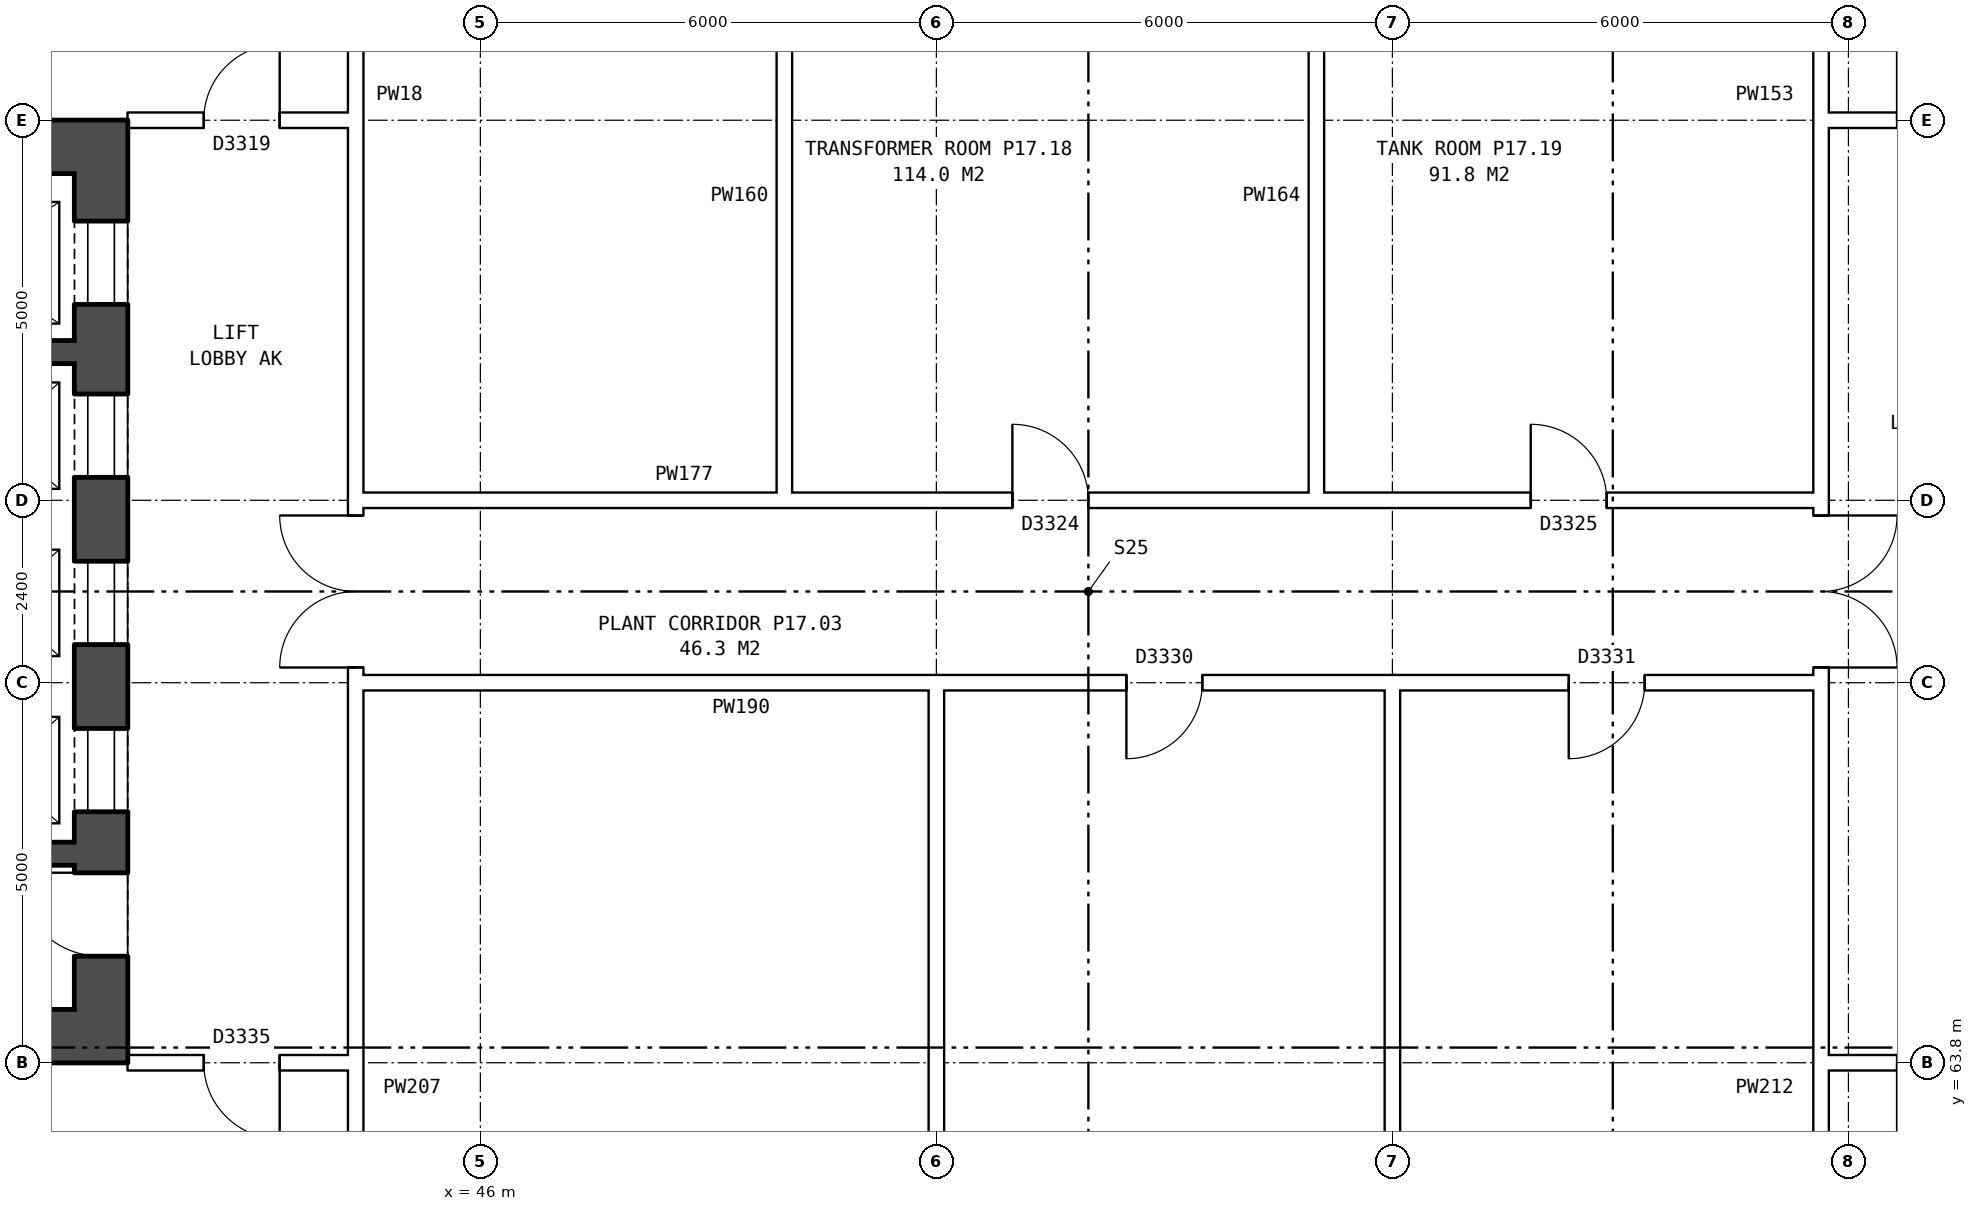
"""IFC4 building model, lengths in metres.
Left out: names, types, materials, properties, quantities, classifications, styles, units other than length and angle.
Written with IfcOpenShell. Run it as: python <this file> out.ifc"""

import sys

from ifc_helpers import new_model, si_unit, direction, frame, frame_2d, origin, place, context, subcontext, project, spatial, rectangle, extrude, element, fill, save


model = new_model("IFC4")
c1 = context("Model", 3, precision=1e-05, world=origin(), true_north=direction((0.0, 1.0)))
c2 = subcontext(c1, "Body", "Model", "MODEL_VIEW")
j1 = project(units=[si_unit("LENGTHUNIT", "METRE"), si_unit("PLANEANGLEUNIT", "RADIAN")], contexts=[c1])
p1 = place(None, origin())
s1 = spatial("IfcSite", under=j1, at=p1, CompositionType="ELEMENT")
p2 = place(p1, origin())
s2 = spatial("IfcBuilding", under=s1, at=p2, CompositionType="ELEMENT")
p3 = place(p2, frame((0.0, 0.0, 62.9)))
s3 = spatial("IfcBuildingStorey", under=s2, at=p3, CompositionType="ELEMENT", Elevation=62.9)
p4 = place(p3, frame((63.64, 63.9, 0.0), z_axis=(0.0, 0.0, 1.0), x_axis=(0.0, 1.0, 0.0)))
e1 = element("IfcWall", 1, at=p4, inside=s3, PredefinedType="PARTITIONING", context=c2, shape_type="SweptSolid", body=[
    extrude(rectangle(XDim=12.2, YDim=0.2, at=frame_2d((6.1, 0.0))), origin(), (0.0, 0.0, 1.0), 4.2),
])
p5 = place(p4, frame((5.1, 0.0, 0.0)))
e2 = element("IfcOpeningElement", 2, at=p5, cuts=e1, PredefinedType="OPENING", context=c2, shape_type="SweptSolid", body=[
    extrude(rectangle(XDim=2.0, YDim=2.1, at=frame_2d((1.0, 1.05))), frame((0.0, 0.11, 0.0), z_axis=(0.0, -1.0, 0.0), x_axis=(1.0, 0.0, 0.0)), (0.0, 0.0, 1.0), 0.22),
])
p6 = place(p3, frame((41.01, 75.5, 0.0), z_axis=(0.0, 0.0, 1.0), x_axis=(0.0, -1.0, 0.0)))
e3 = element("IfcWall", 3, at=p6, inside=s3, PredefinedType="SHEAR", context=c2, shape_type="SweptSolid", body=[
    extrude(rectangle(XDim=11.0, YDim=0.7, at=frame_2d((5.5, 0.0))), origin(), (0.0, 0.0, 1.0), 4.2),
])
p7 = place(p6, frame((0.625, 0.0, 0.0)))
e4 = element("IfcOpeningElement", 4, at=p7, cuts=e3, PredefinedType="OPENING", context=c2, shape_type="SweptSolid", body=[
    extrude(rectangle(XDim=1.1, YDim=2.1, at=frame_2d((0.55, 1.05))), frame((0.0, 0.36, 0.0), z_axis=(0.0, -1.0, 0.0), x_axis=(1.0, 0.0, 0.0)), (0.0, 0.0, 1.0), 0.72),
])
p8 = place(p6, frame((2.9, 0.0, 0.0)))
e5 = element("IfcOpeningElement", 5, at=p8, cuts=e3, PredefinedType="OPENING", context=c2, shape_type="SweptSolid", body=[
    extrude(rectangle(XDim=1.1, YDim=2.1, at=frame_2d((0.55, 1.05))), frame((0.0, 0.36, 0.0), z_axis=(0.0, -1.0, 0.0), x_axis=(1.0, 0.0, 0.0)), (0.0, 0.0, 1.0), 0.72),
])
p9 = place(p6, frame((5.1, 0.0, 0.0)))
e6 = element("IfcOpeningElement", 6, at=p9, cuts=e3, PredefinedType="OPENING", context=c2, shape_type="SweptSolid", body=[
    extrude(rectangle(XDim=1.1, YDim=2.1, at=frame_2d((0.55, 1.05))), frame((0.0, 0.36, 0.0), z_axis=(0.0, -1.0, 0.0), x_axis=(1.0, 0.0, 0.0)), (0.0, 0.0, 1.0), 0.72),
])
p10 = place(p6, frame((7.3, 0.0, 0.0)))
e7 = element("IfcOpeningElement", 7, at=p10, cuts=e3, PredefinedType="OPENING", context=c2, shape_type="SweptSolid", body=[
    extrude(rectangle(XDim=1.1, YDim=2.1, at=frame_2d((0.55, 1.05))), frame((0.0, 0.36, 0.0), z_axis=(0.0, -1.0, 0.0), x_axis=(1.0, 0.0, 0.0)), (0.0, 0.0, 1.0), 0.72),
])
p11 = place(p6, frame((9.2, 0.0, 0.0)))
e8 = element("IfcOpeningElement", 8, at=p11, cuts=e3, PredefinedType="OPENING", context=c2, shape_type="SweptSolid", body=[
    extrude(rectangle(XDim=1.1, YDim=2.1, at=frame_2d((0.55, 1.05))), frame((0.0, 0.36, 0.0), z_axis=(0.0, -1.0, 0.0), x_axis=(1.0, 0.0, 0.0)), (0.0, 0.0, 1.0), 0.72),
])
for number, where, z_axis, x_axis in (
    (9, (41.36, 75.85, 0.0), (0.0, 0.0, 1.0), (-1.0, 0.0, 0.0)),
    (10, (41.36, 64.15, 0.0), (0.0, 0.0, 1.0), (-1.0, 0.0, 0.0)),
):
    element("IfcWall", number, at=place(p3, frame(where, z_axis=z_axis, x_axis=x_axis)), inside=s3, PredefinedType="SHEAR", context=c2, shape_type="SweptSolid", body=[
        extrude(rectangle(XDim=9.0, YDim=0.7, at=frame_2d((4.5, 0.0))), origin(), (0.0, 0.0, 1.0), 4.2),
    ])
p12 = place(p3, frame((40.66, 73.15, 0.0), z_axis=(0.0, 0.0, 1.0), x_axis=(-1.0, 0.0, 0.0)))
e11 = element("IfcWall", 11, at=p12, inside=s3, PredefinedType="SHEAR", context=c2, shape_type="SweptSolid", body=[
    extrude(rectangle(XDim=3.32, YDim=0.3, at=frame_2d((1.66, 0.0))), origin(), (0.0, 0.0, 1.0), 4.2),
])
p13 = place(p3, frame((40.66, 66.55, 0.0), z_axis=(0.0, 0.0, 1.0), x_axis=(-1.0, 0.0, 0.0)))
e12 = element("IfcWall", 12, at=p13, inside=s3, PredefinedType="SHEAR", context=c2, shape_type="SweptSolid", body=[
    extrude(rectangle(XDim=2.2, YDim=0.3, at=frame_2d((1.1, 0.0))), origin(), (0.0, 0.0, 1.0), 4.2),
])
p14 = place(p3, frame((44.36, 63.9, 0.0), z_axis=(0.0, 0.0, 1.0), x_axis=(0.0, 1.0, 0.0)))
e13 = element("IfcWall", 13, at=p14, inside=s3, PredefinedType="PARTITIONING", context=c2, shape_type="SweptSolid", body=[
    extrude(rectangle(XDim=12.2, YDim=0.2, at=frame_2d((6.1, 0.0))), origin(), (0.0, 0.0, 1.0), 4.2),
])
p15 = place(p14, frame((5.1, 0.0, 0.0)))
e14 = element("IfcOpeningElement", 14, at=p15, cuts=e13, PredefinedType="OPENING", context=c2, shape_type="SweptSolid", body=[
    extrude(rectangle(XDim=2.0, YDim=2.1, at=frame_2d((1.0, 1.05))), frame((0.0, 0.11, 0.0), z_axis=(0.0, -1.0, 0.0), x_axis=(1.0, 0.0, 0.0)), (0.0, 0.0, 1.0), 0.22),
])
p16 = place(p3, frame((41.36, 63.8, 0.0), z_axis=(0.0, 0.0, 1.0), x_axis=(1.0, 0.0, 0.0)))
e15 = element("IfcWall", 15, at=p16, inside=s3, PredefinedType="PARTITIONING", context=c2, shape_type="SweptSolid", body=[
    extrude(rectangle(XDim=3.1, YDim=0.2, at=frame_2d((1.55, 0.0))), origin(), (0.0, 0.0, 1.0), 4.2),
])
p17 = place(p16, frame((1.0, 0.0, 0.0)))
e16 = element("IfcOpeningElement", 16, at=p17, cuts=e15, PredefinedType="OPENING", context=c2, shape_type="SweptSolid", body=[
    extrude(rectangle(XDim=1.0, YDim=2.1, at=frame_2d((0.5, 1.05))), frame((0.0, 0.11, 0.0), z_axis=(0.0, -1.0, 0.0), x_axis=(1.0, 0.0, 0.0)), (0.0, 0.0, 1.0), 0.22),
])
p18 = place(p3, frame((63.54, 63.8, 0.0), z_axis=(0.0, 0.0, 1.0), x_axis=(1.0, 0.0, 0.0)))
e17 = element("IfcWall", 17, at=p18, inside=s3, PredefinedType="PARTITIONING", context=c2, shape_type="SweptSolid", body=[
    extrude(rectangle(XDim=3.1, YDim=0.2, at=frame_2d((1.55, 0.0))), origin(), (0.0, 0.0, 1.0), 4.2),
])
p19 = place(p18, frame((1.1, 0.0, 0.0)))
e18 = element("IfcOpeningElement", 18, at=p19, cuts=e17, PredefinedType="OPENING", context=c2, shape_type="SweptSolid", body=[
    extrude(rectangle(XDim=1.0, YDim=2.1, at=frame_2d((0.5, 1.05))), frame((0.0, 0.11, 0.0), z_axis=(0.0, -1.0, 0.0), x_axis=(1.0, 0.0, 0.0)), (0.0, 0.0, 1.0), 0.22),
])
p20 = place(p3, frame((44.36, 68.8, 0.0), z_axis=(0.0, 0.0, 1.0), x_axis=(1.0, 0.0, 0.0)))
e19 = element("IfcWall", 19, at=p20, inside=s3, PredefinedType="PARTITIONING", context=c2, shape_type="SweptSolid", body=[
    extrude(rectangle(XDim=19.28, YDim=0.2, at=frame_2d((9.64, 0.0))), origin(), (0.0, 0.0, 1.0), 4.2),
])
p21 = place(p20, frame((10.14, 0.0, 0.0)))
e20 = element("IfcOpeningElement", 20, at=p21, cuts=e19, PredefinedType="OPENING", context=c2, shape_type="SweptSolid", body=[
    extrude(rectangle(XDim=1.0, YDim=2.1, at=frame_2d((0.5, 1.05))), frame((0.0, 0.11, 0.0), z_axis=(0.0, -1.0, 0.0), x_axis=(1.0, 0.0, 0.0)), (0.0, 0.0, 1.0), 0.22),
])
p22 = place(p20, frame((15.96, 0.0, 0.0)))
e21 = element("IfcOpeningElement", 21, at=p22, cuts=e19, PredefinedType="OPENING", context=c2, shape_type="SweptSolid", body=[
    extrude(rectangle(XDim=1.0, YDim=2.1, at=frame_2d((0.5, 1.05))), frame((0.0, 0.11, 0.0), z_axis=(0.0, -1.0, 0.0), x_axis=(1.0, 0.0, 0.0)), (0.0, 0.0, 1.0), 0.22),
])
p23 = place(p3, frame((44.36, 71.2, 0.0), z_axis=(0.0, 0.0, 1.0), x_axis=(1.0, 0.0, 0.0)))
e22 = element("IfcWall", 22, at=p23, inside=s3, PredefinedType="PARTITIONING", context=c2, shape_type="SweptSolid", body=[
    extrude(rectangle(XDim=19.28, YDim=0.2, at=frame_2d((9.64, 0.0))), origin(), (0.0, 0.0, 1.0), 4.2),
])
p24 = place(p23, frame((8.64, 0.0, 0.0)))
e23 = element("IfcOpeningElement", 23, at=p24, cuts=e22, PredefinedType="OPENING", context=c2, shape_type="SweptSolid", body=[
    extrude(rectangle(XDim=1.0, YDim=2.1, at=frame_2d((0.5, 1.05))), frame((0.0, 0.11, 0.0), z_axis=(0.0, -1.0, 0.0), x_axis=(1.0, 0.0, 0.0)), (0.0, 0.0, 1.0), 0.22),
])
p25 = place(p23, frame((15.46, 0.0, 0.0)))
e24 = element("IfcOpeningElement", 24, at=p25, cuts=e22, PredefinedType="OPENING", context=c2, shape_type="SweptSolid", body=[
    extrude(rectangle(XDim=1.0, YDim=2.1, at=frame_2d((0.5, 1.05))), frame((0.0, 0.11, 0.0), z_axis=(0.0, -1.0, 0.0), x_axis=(1.0, 0.0, 0.0)), (0.0, 0.0, 1.0), 0.22),
])
p26 = place(p3, frame((41.36, 76.2, 0.0), z_axis=(0.0, 0.0, 1.0), x_axis=(1.0, 0.0, 0.0)))
e25 = element("IfcWall", 25, at=p26, inside=s3, PredefinedType="PARTITIONING", context=c2, shape_type="SweptSolid", body=[
    extrude(rectangle(XDim=3.1, YDim=0.2, at=frame_2d((1.55, 0.0))), origin(), (0.0, 0.0, 1.0), 4.2),
])
p27 = place(p26, frame((1.0, 0.0, 0.0)))
e26 = element("IfcOpeningElement", 26, at=p27, cuts=e25, PredefinedType="OPENING", context=c2, shape_type="SweptSolid", body=[
    extrude(rectangle(XDim=1.0, YDim=2.1, at=frame_2d((0.5, 1.05))), frame((0.0, 0.11, 0.0), z_axis=(0.0, -1.0, 0.0), x_axis=(1.0, 0.0, 0.0)), (0.0, 0.0, 1.0), 0.22),
])
p28 = place(p3, frame((63.54, 76.2, 0.0), z_axis=(0.0, 0.0, 1.0), x_axis=(1.0, 0.0, 0.0)))
e27 = element("IfcWall", 27, at=p28, inside=s3, PredefinedType="PARTITIONING", context=c2, shape_type="SweptSolid", body=[
    extrude(rectangle(XDim=3.1, YDim=0.2, at=frame_2d((1.55, 0.0))), origin(), (0.0, 0.0, 1.0), 4.2),
])
p29 = place(p28, frame((1.1, 0.0, 0.0)))
e28 = element("IfcOpeningElement", 28, at=p29, cuts=e27, PredefinedType="OPENING", context=c2, shape_type="SweptSolid", body=[
    extrude(rectangle(XDim=1.0, YDim=2.1, at=frame_2d((0.5, 1.05))), frame((0.0, 0.11, 0.0), z_axis=(0.0, -1.0, 0.0), x_axis=(1.0, 0.0, 0.0)), (0.0, 0.0, 1.0), 0.22),
])
p30 = place(p3, frame((44.36, 60.7, 0.0), z_axis=(0.0, 0.0, 1.0), x_axis=(0.0, 1.0, 0.0)))
e29 = element("IfcWall", 29, at=p30, inside=s3, PredefinedType="PARTITIONING", context=c2, shape_type="SweptSolid", body=[
    extrude(rectangle(XDim=3.2, YDim=0.2, at=frame_2d((1.6, 0.0))), origin(), (0.0, 0.0, 1.0), 4.2),
])
p31 = place(p30, frame((1.1, 0.0, 0.0)))
e30 = element("IfcOpeningElement", 30, at=p31, cuts=e29, PredefinedType="OPENING", context=c2, shape_type="SweptSolid", body=[
    extrude(rectangle(XDim=1.0, YDim=2.1, at=frame_2d((0.5, 1.05))), frame((0.0, 0.11, 0.0), z_axis=(0.0, -1.0, 0.0), x_axis=(1.0, 0.0, 0.0)), (0.0, 0.0, 1.0), 0.22),
])
p32 = place(p3, frame((44.36, 76.1, 0.0), z_axis=(0.0, 0.0, 1.0), x_axis=(0.0, 1.0, 0.0)))
e31 = element("IfcWall", 31, at=p32, inside=s3, PredefinedType="PARTITIONING", context=c2, shape_type="SweptSolid", body=[
    extrude(rectangle(XDim=3.2, YDim=0.2, at=frame_2d((1.6, 0.0))), origin(), (0.0, 0.0, 1.0), 4.2),
])
p33 = place(p32, frame((1.1, 0.0, 0.0)))
e32 = element("IfcOpeningElement", 32, at=p33, cuts=e31, PredefinedType="OPENING", context=c2, shape_type="SweptSolid", body=[
    extrude(rectangle(XDim=1.0, YDim=2.1, at=frame_2d((0.5, 1.05))), frame((0.0, 0.11, 0.0), z_axis=(0.0, -1.0, 0.0), x_axis=(1.0, 0.0, 0.0)), (0.0, 0.0, 1.0), 0.22),
])
p34 = place(p3, frame((50.0, 71.1, 0.0), z_axis=(0.0, 0.0, 1.0), x_axis=(0.0, 1.0, 0.0)))
e33 = element("IfcWall", 33, at=p34, inside=s3, PredefinedType="PARTITIONING", context=c2, shape_type="SweptSolid", body=[
    extrude(rectangle(XDim=8.2, YDim=0.2, at=frame_2d((4.1, 0.0))), origin(), (0.0, 0.0, 1.0), 4.2),
])
p35 = place(p3, frame((52.0, 54.24, 0.0), z_axis=(0.0, 0.0, 1.0), x_axis=(0.0, 1.0, 0.0)))
e34 = element("IfcWall", 34, at=p35, inside=s3, PredefinedType="PARTITIONING", context=c2, shape_type="SweptSolid", body=[
    extrude(rectangle(XDim=14.66, YDim=0.2, at=frame_2d((7.33, 0.0))), origin(), (0.0, 0.0, 1.0), 4.2),
])
p36 = place(p3, frame((57.0, 71.1, 0.0), z_axis=(0.0, 0.0, 1.0), x_axis=(0.0, 1.0, 0.0)))
e35 = element("IfcWall", 35, at=p36, inside=s3, PredefinedType="PARTITIONING", context=c2, shape_type="SweptSolid", body=[
    extrude(rectangle(XDim=8.2, YDim=0.2, at=frame_2d((4.1, 0.0))), origin(), (0.0, 0.0, 1.0), 4.2),
])
p37 = place(p3, frame((58.0, 54.24, 0.0), z_axis=(0.0, 0.0, 1.0), x_axis=(0.0, 1.0, 0.0)))
e36 = element("IfcWall", 36, at=p37, inside=s3, PredefinedType="PARTITIONING", context=c2, shape_type="SweptSolid", body=[
    extrude(rectangle(XDim=14.66, YDim=0.2, at=frame_2d((7.33, 0.0))), origin(), (0.0, 0.0, 1.0), 4.2),
])
for number, where, z_axis, x_axis in (
    (37, (63.64, 60.7, 0.0), (0.0, 0.0, 1.0), (0.0, 1.0, 0.0)),
    (38, (63.64, 76.1, 0.0), (0.0, 0.0, 1.0), (0.0, 1.0, 0.0)),
):
    element("IfcWall", number, at=place(p3, frame(where, z_axis=z_axis, x_axis=x_axis)), inside=s3, PredefinedType="PARTITIONING", context=c2, shape_type="SweptSolid", body=[
        extrude(rectangle(XDim=3.2, YDim=0.2, at=frame_2d((1.6, 0.0))), origin(), (0.0, 0.0, 1.0), 4.2),
    ])
p38 = place(p5, frame((2.0, 0.0, 0.0), z_axis=(0.0, 0.0, 1.0), x_axis=(-1.0, 0.0, 0.0)))
e39 = element("IfcDoor", 39, at=p38, inside=s3, OperationType="DOUBLE_DOOR_SINGLE_SWING", PredefinedType="DOOR", context=c2, shape_type="SweptSolid", body=[
    extrude(rectangle(XDim=2.0, YDim=2.1, at=frame_2d((1.0, 1.05))), frame((0.0, 0.025, 0.0), z_axis=(0.0, -1.0, 0.0), x_axis=(1.0, 0.0, 0.0)), (0.0, 0.0, 1.0), 0.05),
])
fill(e2, e39)
p39 = place(p7, origin())
e40 = element("IfcDoor", 40, at=p39, inside=s3, OperationType="DOUBLE_DOOR_SLIDING", PredefinedType="DOOR", context=c2, shape_type="SweptSolid", body=[
    extrude(rectangle(XDim=1.1, YDim=2.1, at=frame_2d((0.55, 1.05))), frame((0.0, -0.285, 0.0), z_axis=(0.0, -1.0, 0.0), x_axis=(1.0, 0.0, 0.0)), (0.0, 0.0, 1.0), 0.05),
])
fill(e4, e40)
p40 = place(p8, origin())
e41 = element("IfcDoor", 41, at=p40, inside=s3, OperationType="DOUBLE_DOOR_SLIDING", PredefinedType="DOOR", context=c2, shape_type="SweptSolid", body=[
    extrude(rectangle(XDim=1.1, YDim=2.1, at=frame_2d((0.55, 1.05))), frame((0.0, -0.285, 0.0), z_axis=(0.0, -1.0, 0.0), x_axis=(1.0, 0.0, 0.0)), (0.0, 0.0, 1.0), 0.05),
])
fill(e5, e41)
p41 = place(p9, origin())
e42 = element("IfcDoor", 42, at=p41, inside=s3, OperationType="DOUBLE_DOOR_SLIDING", PredefinedType="DOOR", context=c2, shape_type="SweptSolid", body=[
    extrude(rectangle(XDim=1.1, YDim=2.1, at=frame_2d((0.55, 1.05))), frame((0.0, -0.285, 0.0), z_axis=(0.0, -1.0, 0.0), x_axis=(1.0, 0.0, 0.0)), (0.0, 0.0, 1.0), 0.05),
])
fill(e6, e42)
p42 = place(p10, origin())
e43 = element("IfcDoor", 43, at=p42, inside=s3, OperationType="DOUBLE_DOOR_SLIDING", PredefinedType="DOOR", context=c2, shape_type="SweptSolid", body=[
    extrude(rectangle(XDim=1.1, YDim=2.1, at=frame_2d((0.55, 1.05))), frame((0.0, -0.285, 0.0), z_axis=(0.0, -1.0, 0.0), x_axis=(1.0, 0.0, 0.0)), (0.0, 0.0, 1.0), 0.05),
])
fill(e7, e43)
p43 = place(p11, frame((1.1, 0.0, 0.0), z_axis=(0.0, 0.0, 1.0), x_axis=(-1.0, 0.0, 0.0)))
e44 = element("IfcDoor", 44, at=p43, inside=s3, OperationType="SINGLE_SWING_RIGHT", PredefinedType="DOOR", context=c2, shape_type="SweptSolid", body=[
    extrude(rectangle(XDim=1.1, YDim=2.1, at=frame_2d((0.55, 1.05))), frame((0.0, 0.335, 0.0), z_axis=(0.0, -1.0, 0.0), x_axis=(1.0, 0.0, 0.0)), (0.0, 0.0, 1.0), 0.05),
])
fill(e8, e44)
p44 = place(p15, origin())
e45 = element("IfcDoor", 45, at=p44, inside=s3, OperationType="DOUBLE_DOOR_SINGLE_SWING", PredefinedType="DOOR", context=c2, shape_type="SweptSolid", body=[
    extrude(rectangle(XDim=2.0, YDim=2.1, at=frame_2d((1.0, 1.05))), frame((0.0, 0.025, 0.0), z_axis=(0.0, -1.0, 0.0), x_axis=(1.0, 0.0, 0.0)), (0.0, 0.0, 1.0), 0.05),
])
fill(e14, e45)
p45 = place(p17, frame((1.0, 0.0, 0.0), z_axis=(0.0, 0.0, 1.0), x_axis=(-1.0, 0.0, 0.0)))
e46 = element("IfcDoor", 46, at=p45, inside=s3, OperationType="SINGLE_SWING_LEFT", PredefinedType="DOOR", context=c2, shape_type="SweptSolid", body=[
    extrude(rectangle(XDim=1.0, YDim=2.1, at=frame_2d((0.5, 1.05))), frame((0.0, 0.025, 0.0), z_axis=(0.0, -1.0, 0.0), x_axis=(1.0, 0.0, 0.0)), (0.0, 0.0, 1.0), 0.05),
])
fill(e16, e46)
p46 = place(p21, frame((1.0, 0.0, 0.0), z_axis=(0.0, 0.0, 1.0), x_axis=(-1.0, 0.0, 0.0)))
e47 = element("IfcDoor", 47, at=p46, inside=s3, OperationType="SINGLE_SWING_RIGHT", PredefinedType="DOOR", context=c2, shape_type="SweptSolid", body=[
    extrude(rectangle(XDim=1.0, YDim=2.1, at=frame_2d((0.5, 1.05))), frame((0.0, 0.025, 0.0), z_axis=(0.0, -1.0, 0.0), x_axis=(1.0, 0.0, 0.0)), (0.0, 0.0, 1.0), 0.05),
])
fill(e20, e47)
p47 = place(p22, frame((1.0, 0.0, 0.0), z_axis=(0.0, 0.0, 1.0), x_axis=(-1.0, 0.0, 0.0)))
e48 = element("IfcDoor", 48, at=p47, inside=s3, OperationType="SINGLE_SWING_RIGHT", PredefinedType="DOOR", context=c2, shape_type="SweptSolid", body=[
    extrude(rectangle(XDim=1.0, YDim=2.1, at=frame_2d((0.5, 1.05))), frame((0.0, 0.025, 0.0), z_axis=(0.0, -1.0, 0.0), x_axis=(1.0, 0.0, 0.0)), (0.0, 0.0, 1.0), 0.05),
])
fill(e21, e48)
p48 = place(p24, origin())
e49 = element("IfcDoor", 49, at=p48, inside=s3, OperationType="SINGLE_SWING_LEFT", PredefinedType="DOOR", context=c2, shape_type="SweptSolid", body=[
    extrude(rectangle(XDim=1.0, YDim=2.1, at=frame_2d((0.5, 1.05))), frame((0.0, 0.025, 0.0), z_axis=(0.0, -1.0, 0.0), x_axis=(1.0, 0.0, 0.0)), (0.0, 0.0, 1.0), 0.05),
])
fill(e23, e49)
p49 = place(p25, origin())
e50 = element("IfcDoor", 50, at=p49, inside=s3, OperationType="SINGLE_SWING_LEFT", PredefinedType="DOOR", context=c2, shape_type="SweptSolid", body=[
    extrude(rectangle(XDim=1.0, YDim=2.1, at=frame_2d((0.5, 1.05))), frame((0.0, 0.025, 0.0), z_axis=(0.0, -1.0, 0.0), x_axis=(1.0, 0.0, 0.0)), (0.0, 0.0, 1.0), 0.05),
])
fill(e24, e50)
p50 = place(p27, origin())
e51 = element("IfcDoor", 51, at=p50, inside=s3, OperationType="SINGLE_SWING_RIGHT", PredefinedType="DOOR", context=c2, shape_type="SweptSolid", body=[
    extrude(rectangle(XDim=1.0, YDim=2.1, at=frame_2d((0.5, 1.05))), frame((0.0, 0.025, 0.0), z_axis=(0.0, -1.0, 0.0), x_axis=(1.0, 0.0, 0.0)), (0.0, 0.0, 1.0), 0.05),
])
fill(e26, e51)
save(model, sys.argv[1])
